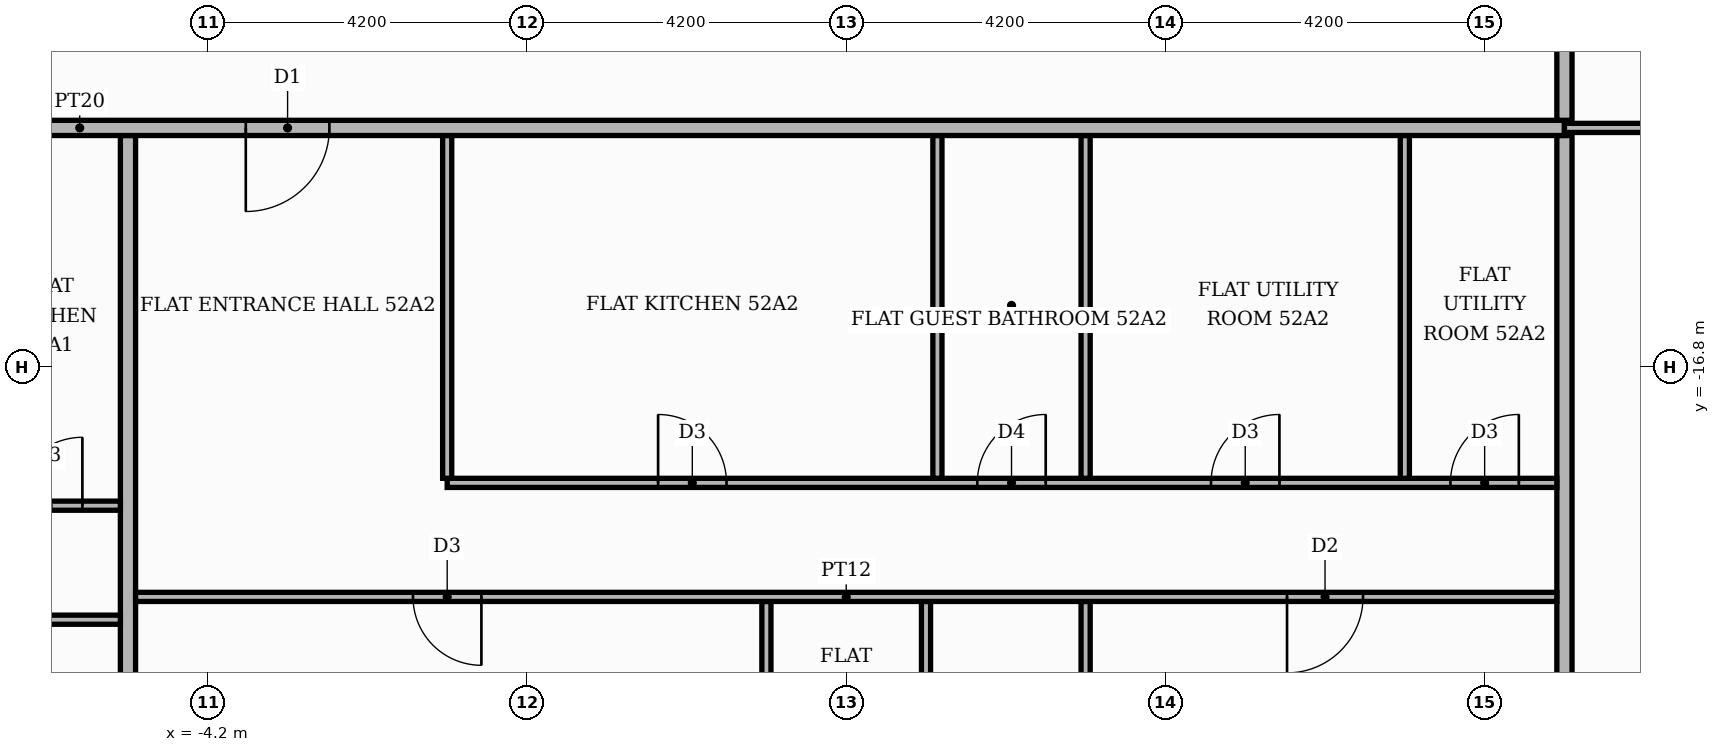
"""IFC4 building model, lengths in metres.
Left out: names, types, materials, properties, quantities, classifications, styles, units other than length and angle.
Written with IfcOpenShell. Run it as: python <this file> out.ifc"""

import sys

from ifc_helpers import new_model, si_unit, direction, frame, frame_2d, origin, place, context, subcontext, project, spatial, rectangle, extrude, element, fill, save


model = new_model("IFC4")
c1 = context("Model", 3, precision=1e-05, world=origin(), true_north=direction((0.0, 1.0)))
c2 = subcontext(c1, "Body", "Model", "MODEL_VIEW")
j1 = project(units=[si_unit("LENGTHUNIT", "METRE"), si_unit("PLANEANGLEUNIT", "RADIAN")], contexts=[c1])
p1 = place(None, origin())
s1 = spatial("IfcSite", under=j1, at=p1, CompositionType="ELEMENT")
p2 = place(p1, origin())
s2 = spatial("IfcBuilding", under=s1, at=p2, CompositionType="ELEMENT")
p3 = place(p2, frame((0.0, 0.0, 219.6)))
s3 = spatial("IfcBuildingStorey", under=s2, at=p3, CompositionType="ELEMENT", Elevation=219.6)
p4 = place(p3, frame((-5.25, -25.42, 0.0), z_axis=(0.0, 0.0, 1.0), x_axis=(0.0, 1.0, 0.0)))
e1 = element("IfcWall", 1, at=p4, inside=s3, PredefinedType="PARTITIONING", context=c2, shape_type="SweptSolid", body=[
    extrude(rectangle(XDim=11.67, YDim=0.2, at=frame_2d((5.835, 0.0))), origin(), (0.0, 0.0, 1.0), 3.48),
])
p5 = place(p3, frame((3.15, -25.42, 0.0), z_axis=(0.0, 0.0, 1.0), x_axis=(0.0, 1.0, 0.0)))
e2 = element("IfcWall", 2, at=p5, inside=s3, PredefinedType="PARTITIONING", context=c2, shape_type="SweptSolid", body=[
    extrude(rectangle(XDim=5.54, YDim=0.12, at=frame_2d((2.77, 0.0))), origin(), (0.0, 0.0, 1.0), 3.48),
])
p6 = place(p5, frame((2.2, 0.0, 0.0)))
e3 = element("IfcOpeningElement", 3, at=p6, cuts=e2, PredefinedType="OPENING", context=c2, shape_type="SweptSolid", body=[
    extrude(rectangle(XDim=0.9, YDim=2.1, at=frame_2d((0.45, 1.05))), frame((0.0, 0.07, 0.0), z_axis=(0.0, -1.0, 0.0), x_axis=(1.0, 0.0, 0.0)), (0.0, 0.0, 1.0), 0.14),
])
p7 = place(p3, frame((5.25, -25.42, 0.0), z_axis=(0.0, 0.0, 1.0), x_axis=(0.0, 1.0, 0.0)))
e4 = element("IfcWall", 4, at=p7, inside=s3, PredefinedType="PARTITIONING", context=c2, shape_type="SweptSolid", body=[
    extrude(rectangle(XDim=5.54, YDim=0.12, at=frame_2d((2.77, 0.0))), origin(), (0.0, 0.0, 1.0), 3.48),
])
p8 = place(p7, frame((2.2, 0.0, 0.0)))
e5 = element("IfcOpeningElement", 5, at=p8, cuts=e4, PredefinedType="OPENING", context=c2, shape_type="SweptSolid", body=[
    extrude(rectangle(XDim=0.9, YDim=2.1, at=frame_2d((0.45, 1.05))), frame((0.0, 0.07, 0.0), z_axis=(0.0, -1.0, 0.0), x_axis=(1.0, 0.0, 0.0)), (0.0, 0.0, 1.0), 0.14),
])
p9 = place(p3, frame((7.35, -25.42, 0.0), z_axis=(0.0, 0.0, 1.0), x_axis=(0.0, 1.0, 0.0)))
e6 = element("IfcWall", 6, at=p9, inside=s3, PredefinedType="PARTITIONING", context=c2, shape_type="SweptSolid", body=[
    extrude(rectangle(XDim=5.54, YDim=0.12, at=frame_2d((2.77, 0.0))), origin(), (0.0, 0.0, 1.0), 3.48),
])
p10 = place(p3, frame((13.65, -25.42, 0.0), z_axis=(0.0, 0.0, 1.0), x_axis=(0.0, 1.0, 0.0)))
e7 = element("IfcWall", 7, at=p10, inside=s3, PredefinedType="PARTITIONING", context=c2, shape_type="SweptSolid", body=[
    extrude(rectangle(XDim=11.67, YDim=0.2, at=frame_2d((5.835, 0.0))), origin(), (0.0, 0.0, 1.0), 3.48),
])
p11 = place(p3, frame((-25.42, -20.12, 0.0), z_axis=(0.0, 0.0, 1.0), x_axis=(1.0, 0.0, 0.0)))
e8 = element("IfcWall", 8, at=p11, inside=s3, PredefinedType="PARTITIONING", context=c2, shape_type="SweptSolid", body=[
    extrude(rectangle(XDim=20.07, YDim=0.12, at=frame_2d((10.035, 0.0))), origin(), (0.0, 0.0, 1.0), 3.48),
])
p12 = place(p11, frame((10.22, 0.0, 0.0)))
e9 = element("IfcOpeningElement", 9, at=p12, cuts=e8, PredefinedType="OPENING", context=c2, shape_type="SweptSolid", body=[
    extrude(rectangle(XDim=1.0, YDim=2.1, at=frame_2d((0.5, 1.05))), frame((0.0, 0.07, 0.0), z_axis=(0.0, -1.0, 0.0), x_axis=(1.0, 0.0, 0.0)), (0.0, 0.0, 1.0), 0.14),
])
p13 = place(p11, frame((13.42, 0.0, 0.0)))
e10 = element("IfcOpeningElement", 10, at=p13, cuts=e8, PredefinedType="OPENING", context=c2, shape_type="SweptSolid", body=[
    extrude(rectangle(XDim=0.9, YDim=2.1, at=frame_2d((0.45, 1.05))), frame((0.0, 0.07, 0.0), z_axis=(0.0, -1.0, 0.0), x_axis=(1.0, 0.0, 0.0)), (0.0, 0.0, 1.0), 0.14),
])
p14 = place(p3, frame((-5.15, -19.82, 0.0), z_axis=(0.0, 0.0, 1.0), x_axis=(1.0, 0.0, 0.0)))
e11 = element("IfcWall", 11, at=p14, inside=s3, PredefinedType="PARTITIONING", context=c2, shape_type="SweptSolid", body=[
    extrude(rectangle(XDim=18.7, YDim=0.12, at=frame_2d((9.35, 0.0))), origin(), (0.0, 0.0, 1.0), 3.48),
])
p15 = place(p14, frame((3.65, 0.0, 0.0)))
e12 = element("IfcOpeningElement", 12, at=p15, cuts=e11, PredefinedType="OPENING", context=c2, shape_type="SweptSolid", body=[
    extrude(rectangle(XDim=0.9, YDim=2.1, at=frame_2d((0.45, 1.05))), frame((0.0, 0.07, 0.0), z_axis=(0.0, -1.0, 0.0), x_axis=(1.0, 0.0, 0.0)), (0.0, 0.0, 1.0), 0.14),
])
p16 = place(p14, frame((15.15, 0.0, 0.0)))
e13 = element("IfcOpeningElement", 13, at=p16, cuts=e11, PredefinedType="OPENING", context=c2, shape_type="SweptSolid", body=[
    extrude(rectangle(XDim=1.0, YDim=2.1, at=frame_2d((0.5, 1.05))), frame((0.0, 0.07, 0.0), z_axis=(0.0, -1.0, 0.0), x_axis=(1.0, 0.0, 0.0)), (0.0, 0.0, 1.0), 0.14),
])
p17 = place(p3, frame((-9.45, -18.62, 0.0), z_axis=(0.0, 0.0, 1.0), x_axis=(1.0, 0.0, 0.0)))
e14 = element("IfcWall", 14, at=p17, inside=s3, PredefinedType="PARTITIONING", context=c2, shape_type="SweptSolid", body=[
    extrude(rectangle(XDim=4.1, YDim=0.12, at=frame_2d((2.05, 0.0))), origin(), (0.0, 0.0, 1.0), 3.48),
])
p18 = place(p17, frame((2.7, 0.0, 0.0)))
e15 = element("IfcOpeningElement", 15, at=p18, cuts=e14, PredefinedType="OPENING", context=c2, shape_type="SweptSolid", body=[
    extrude(rectangle(XDim=0.9, YDim=2.1, at=frame_2d((0.45, 1.05))), frame((0.0, 0.07, 0.0), z_axis=(0.0, -1.0, 0.0), x_axis=(1.0, 0.0, 0.0)), (0.0, 0.0, 1.0), 0.14),
])
p19 = place(p3, frame((-1.05, -18.32, 0.0), z_axis=(0.0, 0.0, 1.0), x_axis=(1.0, 0.0, 0.0)))
e16 = element("IfcWall", 16, at=p19, inside=s3, PredefinedType="PARTITIONING", context=c2, shape_type="SweptSolid", body=[
    extrude(rectangle(XDim=14.6, YDim=0.12, at=frame_2d((7.3, 0.0))), origin(), (0.0, 0.0, 1.0), 3.48),
])
p20 = place(p19, frame((2.775, 0.0, 0.0)))
e17 = element("IfcOpeningElement", 17, at=p20, cuts=e16, PredefinedType="OPENING", context=c2, shape_type="SweptSolid", body=[
    extrude(rectangle(XDim=0.9, YDim=2.1, at=frame_2d((0.45, 1.05))), frame((0.0, 0.07, 0.0), z_axis=(0.0, -1.0, 0.0), x_axis=(1.0, 0.0, 0.0)), (0.0, 0.0, 1.0), 0.14),
])
p21 = place(p19, frame((6.975, 0.0, 0.0)))
e18 = element("IfcOpeningElement", 18, at=p21, cuts=e16, PredefinedType="OPENING", context=c2, shape_type="SweptSolid", body=[
    extrude(rectangle(XDim=0.9, YDim=2.1, at=frame_2d((0.45, 1.05))), frame((0.0, 0.07, 0.0), z_axis=(0.0, -1.0, 0.0), x_axis=(1.0, 0.0, 0.0)), (0.0, 0.0, 1.0), 0.14),
])
p22 = place(p19, frame((10.05, 0.0, 0.0)))
e19 = element("IfcOpeningElement", 19, at=p22, cuts=e16, PredefinedType="OPENING", context=c2, shape_type="SweptSolid", body=[
    extrude(rectangle(XDim=0.9, YDim=2.1, at=frame_2d((0.45, 1.05))), frame((0.0, 0.07, 0.0), z_axis=(0.0, -1.0, 0.0), x_axis=(1.0, 0.0, 0.0)), (0.0, 0.0, 1.0), 0.14),
])
p23 = place(p19, frame((13.2, 0.0, 0.0)))
e20 = element("IfcOpeningElement", 20, at=p23, cuts=e16, PredefinedType="OPENING", context=c2, shape_type="SweptSolid", body=[
    extrude(rectangle(XDim=0.9, YDim=2.1, at=frame_2d((0.45, 1.05))), frame((0.0, 0.07, 0.0), z_axis=(0.0, -1.0, 0.0), x_axis=(1.0, 0.0, 0.0)), (0.0, 0.0, 1.0), 0.14),
])
for number, where, z_axis, x_axis in (
    (21, (-1.05, -18.26, 0.0), (0.0, 0.0, 1.0), (0.0, 1.0, 0.0)),
    (22, (5.4, -18.26, 0.0), (0.0, 0.0, 1.0), (0.0, 1.0, 0.0)),
    (23, (7.35, -18.26, 0.0), (0.0, 0.0, 1.0), (0.0, 1.0, 0.0)),
    (24, (11.55, -18.26, 0.0), (0.0, 0.0, 1.0), (0.0, 1.0, 0.0)),
):
    element("IfcWall", number, at=place(p3, frame(where, z_axis=z_axis, x_axis=x_axis)), inside=s3, PredefinedType="PARTITIONING", context=c2, shape_type="SweptSolid", body=[
        extrude(rectangle(XDim=4.51, YDim=0.12, at=frame_2d((2.255, 0.0))), origin(), (0.0, 0.0, 1.0), 3.48),
    ])
p24 = place(p3, frame((-25.42, -13.65, 0.0), z_axis=(0.0, 0.0, 1.0), x_axis=(1.0, 0.0, 0.0)))
e25 = element("IfcWall", 25, at=p24, inside=s3, PredefinedType="PARTITIONING", context=c2, shape_type="SweptSolid", body=[
    extrude(rectangle(XDim=39.07, YDim=0.2, at=frame_2d((19.535, 0.0))), origin(), (0.0, 0.0, 1.0), 3.48),
])
p25 = place(p24, frame((13.32, 0.0, 0.0)))
e26 = element("IfcOpeningElement", 26, at=p25, cuts=e25, PredefinedType="OPENING", context=c2, shape_type="SweptSolid", body=[
    extrude(rectangle(XDim=1.1, YDim=2.4, at=frame_2d((0.55, 1.2))), frame((0.0, 0.11, 0.0), z_axis=(0.0, -1.0, 0.0), x_axis=(1.0, 0.0, 0.0)), (0.0, 0.0, 1.0), 0.22),
])
p26 = place(p24, frame((21.72, 0.0, 0.0)))
e27 = element("IfcOpeningElement", 27, at=p26, cuts=e25, PredefinedType="OPENING", context=c2, shape_type="SweptSolid", body=[
    extrude(rectangle(XDim=1.1, YDim=2.4, at=frame_2d((0.55, 1.2))), frame((0.0, 0.11, 0.0), z_axis=(0.0, -1.0, 0.0), x_axis=(1.0, 0.0, 0.0)), (0.0, 0.0, 1.0), 0.22),
])
p27 = place(p3, frame((13.65, -13.65, 0.0), z_axis=(0.0, 0.0, 1.0), x_axis=(1.0, 0.0, 0.0)))
e28 = element("IfcWall", 28, at=p27, inside=s3, PredefinedType="PARTITIONING", context=c2, shape_type="SweptSolid", body=[
    extrude(rectangle(XDim=6.77, YDim=0.12, at=frame_2d((3.385, 0.0))), origin(), (0.0, 0.0, 1.0), 3.48),
])
p28 = place(p27, frame((2.935, 0.0, 0.0)))
e29 = element("IfcOpeningElement", 29, at=p28, cuts=e28, PredefinedType="OPENING", context=c2, shape_type="SweptSolid", body=[
    extrude(rectangle(XDim=0.9, YDim=2.1, at=frame_2d((0.45, 1.05))), frame((0.0, 0.07, 0.0), z_axis=(0.0, -1.0, 0.0), x_axis=(1.0, 0.0, 0.0)), (0.0, 0.0, 1.0), 0.14),
])
p29 = place(p3, frame((13.65, -13.55, 0.0), z_axis=(0.0, 0.0, 1.0), x_axis=(0.0, 1.0, 0.0)))
e30 = element("IfcWall", 30, at=p29, inside=s3, PredefinedType="PARTITIONING", context=c2, shape_type="SweptSolid", body=[
    extrude(rectangle(XDim=2.45, YDim=0.2, at=frame_2d((1.225, 0.0))), origin(), (0.0, 0.0, 1.0), 3.48),
])
p30 = place(p18, origin())
e31 = element("IfcDoor", 31, at=p30, inside=s3, OperationType="SINGLE_SWING_RIGHT", PredefinedType="DOOR", context=c2, shape_type="SweptSolid", body=[
    extrude(rectangle(XDim=0.9, YDim=2.1, at=frame_2d((0.45, 1.05))), frame((0.0, 0.025, 0.0), z_axis=(0.0, -1.0, 0.0), x_axis=(1.0, 0.0, 0.0)), (0.0, 0.0, 1.0), 0.05),
])
fill(e15, e31)
p31 = place(p26, frame((1.1, 0.0, 0.0), z_axis=(0.0, 0.0, 1.0), x_axis=(-1.0, 0.0, 0.0)))
e32 = element("IfcDoor", 32, at=p31, inside=s3, OperationType="SINGLE_SWING_LEFT", PredefinedType="DOOR", context=c2, shape_type="SweptSolid", body=[
    extrude(rectangle(XDim=1.1, YDim=2.4, at=frame_2d((0.55, 1.2))), frame((0.0, 0.025, 0.0), z_axis=(0.0, -1.0, 0.0), x_axis=(1.0, 0.0, 0.0)), (0.0, 0.0, 1.0), 0.05),
])
fill(e27, e32)
p32 = place(p20, origin())
e33 = element("IfcDoor", 33, at=p32, inside=s3, OperationType="SINGLE_SWING_LEFT", PredefinedType="DOOR", context=c2, shape_type="SweptSolid", body=[
    extrude(rectangle(XDim=0.9, YDim=2.1, at=frame_2d((0.45, 1.05))), frame((0.0, 0.025, 0.0), z_axis=(0.0, -1.0, 0.0), x_axis=(1.0, 0.0, 0.0)), (0.0, 0.0, 1.0), 0.05),
])
fill(e17, e33)
p33 = place(p21, origin())
e34 = element("IfcDoor", 34, at=p33, inside=s3, OperationType="SINGLE_SWING_RIGHT", PredefinedType="DOOR", context=c2, shape_type="SweptSolid", body=[
    extrude(rectangle(XDim=0.9, YDim=2.1, at=frame_2d((0.45, 1.05))), frame((0.0, 0.025, 0.0), z_axis=(0.0, -1.0, 0.0), x_axis=(1.0, 0.0, 0.0)), (0.0, 0.0, 1.0), 0.05),
])
fill(e18, e34)
p34 = place(p22, origin())
e35 = element("IfcDoor", 35, at=p34, inside=s3, OperationType="SINGLE_SWING_RIGHT", PredefinedType="DOOR", context=c2, shape_type="SweptSolid", body=[
    extrude(rectangle(XDim=0.9, YDim=2.1, at=frame_2d((0.45, 1.05))), frame((0.0, 0.025, 0.0), z_axis=(0.0, -1.0, 0.0), x_axis=(1.0, 0.0, 0.0)), (0.0, 0.0, 1.0), 0.05),
])
fill(e19, e35)
p35 = place(p23, origin())
e36 = element("IfcDoor", 36, at=p35, inside=s3, OperationType="SINGLE_SWING_RIGHT", PredefinedType="DOOR", context=c2, shape_type="SweptSolid", body=[
    extrude(rectangle(XDim=0.9, YDim=2.1, at=frame_2d((0.45, 1.05))), frame((0.0, 0.025, 0.0), z_axis=(0.0, -1.0, 0.0), x_axis=(1.0, 0.0, 0.0)), (0.0, 0.0, 1.0), 0.05),
])
fill(e20, e36)
p36 = place(p15, frame((0.9, 0.0, 0.0), z_axis=(0.0, 0.0, 1.0), x_axis=(-1.0, 0.0, 0.0)))
e37 = element("IfcDoor", 37, at=p36, inside=s3, OperationType="SINGLE_SWING_RIGHT", PredefinedType="DOOR", context=c2, shape_type="SweptSolid", body=[
    extrude(rectangle(XDim=0.9, YDim=2.1, at=frame_2d((0.45, 1.05))), frame((0.0, 0.025, 0.0), z_axis=(0.0, -1.0, 0.0), x_axis=(1.0, 0.0, 0.0)), (0.0, 0.0, 1.0), 0.05),
])
fill(e12, e37)
p37 = place(p16, frame((1.0, 0.0, 0.0), z_axis=(0.0, 0.0, 1.0), x_axis=(-1.0, 0.0, 0.0)))
e38 = element("IfcDoor", 38, at=p37, inside=s3, OperationType="SINGLE_SWING_LEFT", PredefinedType="DOOR", context=c2, shape_type="SweptSolid", body=[
    extrude(rectangle(XDim=1.0, YDim=2.1, at=frame_2d((0.5, 1.05))), frame((0.0, 0.025, 0.0), z_axis=(0.0, -1.0, 0.0), x_axis=(1.0, 0.0, 0.0)), (0.0, 0.0, 1.0), 0.05),
])
fill(e13, e38)
save(model, sys.argv[1])
